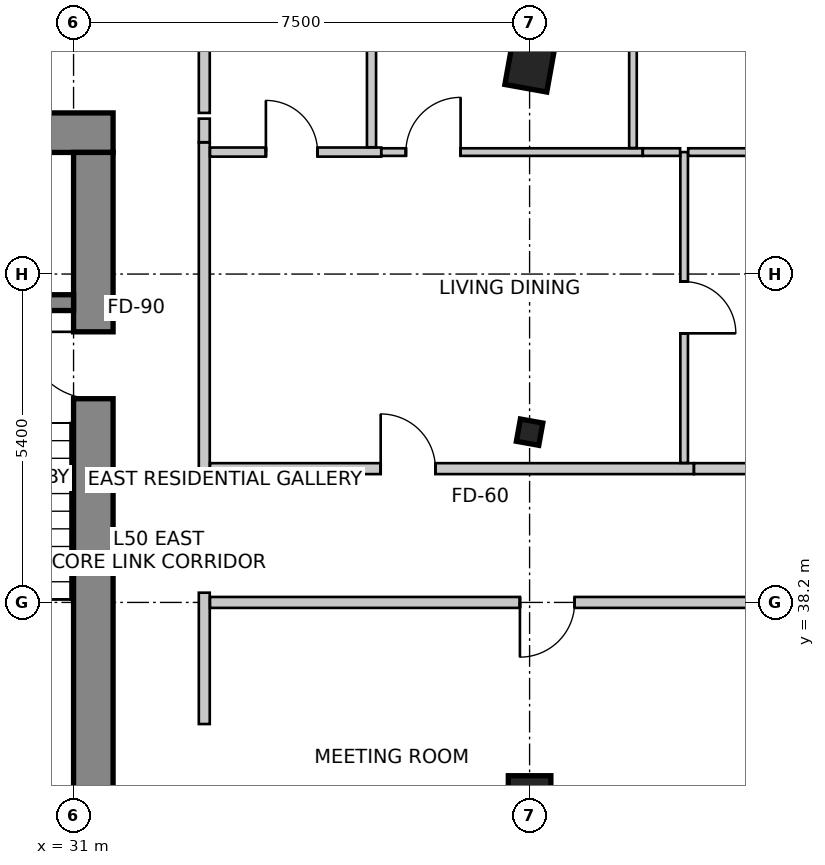
"""IFC4 building model, lengths in metres.
Left out: names, types, materials, properties, quantities, classifications, styles, units other than length and angle.
Written with IfcOpenShell. Run it as: python <this file> out.ifc"""

import sys

from ifc_helpers import new_model, si_unit, direction, frame, frame_2d, origin, origin_2d, place, context, subcontext, project, spatial, rectangle, i_section, extrude, source, transform, mapped, element, fill, save


model = new_model("IFC4")
c1 = context("Model", 3, precision=1e-05, world=origin(), true_north=direction((0.0, 1.0)))
c2 = subcontext(c1, "Body", "Model", "MODEL_VIEW")
j1 = project(units=[si_unit("LENGTHUNIT", "METRE"), si_unit("PLANEANGLEUNIT", "RADIAN")], contexts=[c1])
p1 = place(None, origin())
s1 = spatial("IfcSite", under=j1, at=p1, CompositionType="ELEMENT")
p2 = place(p1, origin())
s2 = spatial("IfcBuilding", under=s1, at=p2, CompositionType="ELEMENT")
p3 = place(p2, frame((0.0, 0.0, 200.9)))
s3 = spatial("IfcBuildingStorey", under=s2, at=p3, CompositionType="ELEMENT", Elevation=200.9)
p4 = place(p3, frame((15.95, 45.925, 0.0), z_axis=(0.0, 0.0, 1.0), x_axis=(1.0, 0.0, 0.0)))
e1 = element("IfcWall", 1, at=p4, inside=s3, PredefinedType="SHEAR", context=c2, shape_type="SweptSolid", body=[
    extrude(rectangle(XDim=15.7, YDim=0.65, at=frame_2d((7.85, 0.0))), origin(), (0.0, 0.0, 1.0), 3.5),
])
p5 = place(p3, frame((31.325, 34.2, 0.0), z_axis=(0.0, 0.0, 1.0), x_axis=(0.0, 1.0, 0.0)))
e2 = element("IfcWall", 2, at=p5, inside=s3, PredefinedType="SHEAR", context=c2, shape_type="SweptSolid", body=[
    extrude(rectangle(XDim=11.4, YDim=0.65, at=frame_2d((5.7, 0.0))), origin(), (0.0, 0.0, 1.0), 3.5),
])
m1 = source(origin(), c2, "Body", "SweptSolid", [
    extrude(rectangle(XDim=1.1, YDim=2.15, at=frame_2d((0.55, 1.075))), frame((0.0, 0.335, 0.0), z_axis=(0.0, -1.0, 0.0), x_axis=(1.0, 0.0, 0.0)), (0.0, 0.0, 1.0), 0.67),
])
p6 = place(p5, frame((7.35, 0.0, 0.0)))
e3 = element("IfcOpeningElement", 3, at=p6, cuts=e2, PredefinedType="OPENING", context=c2, shape_type="MappedRepresentation", body=[
    mapped(m1, transform((0.0, 0.0, 0.0), scale=1.0)),
])
p7 = place(p3, frame((27.5, 43.13, 0.0), z_axis=(0.0, 0.0, 1.0), x_axis=(1.0, 0.0, 0.0)))
e4 = element("IfcWall", 4, at=p7, inside=s3, PredefinedType="SHEAR", context=c2, shape_type="SweptSolid", body=[
    extrude(rectangle(XDim=3.5, YDim=0.26, at=frame_2d((1.75, 0.0))), origin(), (0.0, 0.0, 1.0), 3.5),
])
m2 = source(origin(), c2, "Body", "SweptSolid", [
    extrude(rectangle(XDim=0.7, YDim=0.7, at=origin_2d()), origin(), (0.0, 0.0, 1.0), 3.5),
])
for number, where, z_axis, x_axis in (
    (5, (38.5, 47.0, 0.0), (0.0, 0.0, 1.0), (0.984, -0.177, 0.0)),
    (6, (38.5, 35.0, 0.0), (0.0, 0.0, 1.0), (1.0, 0.0, 0.0)),
):
    element("IfcColumn", number, at=place(p3, frame(where, z_axis=z_axis, x_axis=x_axis)), inside=s3, PredefinedType="COLUMN", context=c2, shape_type="MappedRepresentation", body=[
        mapped(m2, transform((0.0, 0.0, 0.0), scale=1.0)),
    ])
m3 = source(origin(), c2, "Body", "SweptSolid", [
    extrude(i_section(OverallWidth=0.374, OverallDepth=0.372, WebThickness=0.016, FlangeThickness=0.026, FilletRadius=0.015, at=origin_2d()), origin(), (0.0, 0.0, 1.0), 3.5),
])
p8 = place(p3, frame((38.5, 41.0, 0.0), z_axis=(0.0, 0.0, 1.0), x_axis=(0.984195607969, -0.17708474032, 0.0)))
e7 = element("IfcColumn", 7, at=p8, inside=s3, PredefinedType="COLUMN", context=c2, shape_type="MappedRepresentation", body=[
    mapped(m3, transform((0.0, 0.0, 0.0), scale=1.0)),
])
p9 = place(p3, frame((33.15, 47.706, 0.0), z_axis=(0.0, 0.0, 1.0), x_axis=(0.0, -1.0, 0.0)))
e8 = element("IfcWall", 8, at=p9, inside=s3, PredefinedType="PARTITIONING", context=c2, shape_type="SweptSolid", body=[
    extrude(rectangle(XDim=1.456, YDim=0.18, at=frame_2d((0.728, 0.0))), origin(), (0.0, 0.0, 1.0), 2.822),
])
p10 = place(p3, frame((33.15, 45.766, 0.0), z_axis=(0.0, 0.0, 1.0), x_axis=(0.0, -1.0, 0.0)))
e9 = element("IfcWall", 9, at=p10, inside=s3, PredefinedType="PARTITIONING", context=c2, shape_type="SweptSolid", body=[
    extrude(rectangle(XDim=5.526, YDim=0.18, at=frame_2d((2.763, 0.0))), origin(), (0.0, 0.0, 1.0), 2.822),
])
p11 = place(p3, frame((33.15, 46.156, 0.0), z_axis=(0.0, 0.0, 1.0), x_axis=(0.0, -1.0, 0.0)))
e10 = element("IfcWall", 10, at=p11, inside=s3, PredefinedType="PARTITIONING", context=c2, shape_type="SweptSolid", body=[
    extrude(rectangle(XDim=0.388, YDim=0.18, at=frame_2d((0.194, 0.0))), origin(), (0.0, 0.0, 1.0), 2.934),
])
p12 = place(p3, frame((33.15, 38.36, 0.0), z_axis=(0.0, 0.0, 1.0), x_axis=(0.0, -1.0, 0.0)))
e11 = element("IfcWall", 11, at=p12, inside=s3, PredefinedType="PARTITIONING", context=c2, shape_type="SweptSolid", body=[
    extrude(rectangle(XDim=2.16, YDim=0.18, at=frame_2d((1.08, 0.0))), origin(), (0.0, 0.0, 1.0), 3.25),
])
p13 = place(p3, frame((33.244, 40.4, 0.0), z_axis=(0.0, 0.0, 1.0), x_axis=(1.0, 0.0, 0.0)))
e12 = element("IfcWall", 12, at=p13, inside=s3, PredefinedType="PARTITIONING", context=c2, shape_type="SweptSolid", body=[
    extrude(rectangle(XDim=7.958, YDim=0.18, at=frame_2d((3.979, 0.0))), origin(), (0.0, 0.0, 1.0), 2.766),
])
m4 = source(origin(), c2, "Body", "SweptSolid", [
    extrude(rectangle(XDim=0.9, YDim=2.15, at=frame_2d((0.45, 1.075))), frame((0.0, 0.1, 0.0), z_axis=(0.0, -1.0, 0.0), x_axis=(1.0, 0.0, 0.0)), (0.0, 0.0, 1.0), 0.2),
])
p14 = place(p13, frame((2.807, 0.0, 0.0)))
e13 = element("IfcOpeningElement", 13, at=p14, cuts=e12, PredefinedType="OPENING", context=c2, shape_type="MappedRepresentation", body=[
    mapped(m4, transform((0.0, 0.0, 0.0), scale=1.0)),
])
p15 = place(p3, frame((41.204, 40.4, 0.0), z_axis=(0.0, 0.0, 1.0), x_axis=(1.0, 0.0, 0.0)))
e14 = element("IfcWall", 14, at=p15, inside=s3, PredefinedType="PARTITIONING", context=c2, shape_type="SweptSolid", body=[
    extrude(rectangle(XDim=3.456, YDim=0.18, at=frame_2d((1.728, 0.0))), origin(), (0.0, 0.0, 1.0), 2.822),
])
p16 = place(p3, frame((44.338, 38.2, 0.0), z_axis=(0.0, 0.0, 1.0), x_axis=(-1.0, 0.0, 0.0)))
e15 = element("IfcWall", 15, at=p16, inside=s3, PredefinedType="PARTITIONING", context=c2, shape_type="SweptSolid", body=[
    extrude(rectangle(XDim=11.094, YDim=0.18, at=frame_2d((5.547, 0.0))), origin(), (0.0, 0.0, 1.0), 2.766),
])
p17 = place(p16, frame((5.097, 0.0, 0.0)))
e16 = element("IfcOpeningElement", 16, at=p17, cuts=e15, PredefinedType="OPENING", context=c2, shape_type="MappedRepresentation", body=[
    mapped(m4, transform((0.0, 0.0, 0.0), scale=1.0)),
])
p18 = place(p3, frame((41.042, 45.606, 0.0), z_axis=(0.0, 0.0, 1.0), x_axis=(0.0, -1.0, 0.0)))
e17 = element("IfcWall", 17, at=p18, inside=s3, PredefinedType="PARTITIONING", context=c2, shape_type="SweptSolid", body=[
    extrude(rectangle(XDim=5.112, YDim=0.125, at=frame_2d((2.556, 0.0))), origin(), (0.0, 0.0, 1.0), 2.822),
])
m5 = source(origin(), c2, "Body", "SweptSolid", [
    extrude(rectangle(XDim=0.85, YDim=2.15, at=frame_2d((0.425, 1.075))), frame((0.0, 0.073, 0.0), z_axis=(0.0, -1.0, 0.0), x_axis=(1.0, 0.0, 0.0)), (0.0, 0.0, 1.0), 0.145),
])
p19 = place(p18, frame((2.131, 0.0, 0.0)))
e18 = element("IfcOpeningElement", 18, at=p19, cuts=e17, PredefinedType="OPENING", context=c2, shape_type="MappedRepresentation", body=[
    mapped(m5, transform((0.0, 0.0, 0.0), scale=1.0)),
])
p20 = place(p3, frame((33.244, 45.606, 0.0), z_axis=(0.0, 0.0, 1.0), x_axis=(1.0, 0.0, 0.0)))
e19 = element("IfcWall", 19, at=p20, inside=s3, PredefinedType="PARTITIONING", context=c2, shape_type="SweptSolid", body=[
    extrude(rectangle(XDim=2.816, YDim=0.15, at=frame_2d((1.408, 0.0))), origin(), (0.0, 0.0, 1.0), 2.822),
])
m6 = source(origin(), c2, "Body", "SweptSolid", [
    extrude(rectangle(XDim=0.85, YDim=2.15, at=frame_2d((0.425, 1.075))), frame((0.0, 0.085, 0.0), z_axis=(0.0, -1.0, 0.0), x_axis=(1.0, 0.0, 0.0)), (0.0, 0.0, 1.0), 0.17),
])
p21 = place(p20, frame((0.919, 0.0, 0.0)))
e20 = element("IfcOpeningElement", 20, at=p21, cuts=e19, PredefinedType="OPENING", context=c2, shape_type="MappedRepresentation", body=[
    mapped(m6, transform((0.0, 0.0, 0.0), scale=1.0)),
])
p22 = place(p3, frame((36.062, 45.606, 0.0), z_axis=(0.0, 0.0, 1.0), x_axis=(1.0, 0.0, 0.0)))
e21 = element("IfcWall", 21, at=p22, inside=s3, PredefinedType="PARTITIONING", context=c2, shape_type="SweptSolid", body=[
    extrude(rectangle(XDim=4.298, YDim=0.125, at=frame_2d((2.149, 0.0))), origin(), (0.0, 0.0, 1.0), 2.766),
])
m7 = source(origin(), c2, "Body", "SweptSolid", [
    extrude(rectangle(XDim=0.9, YDim=2.15, at=frame_2d((0.45, 1.075))), frame((0.0, 0.073, 0.0), z_axis=(0.0, -1.0, 0.0), x_axis=(1.0, 0.0, 0.0)), (0.0, 0.0, 1.0), 0.145),
])
p23 = place(p22, frame((0.403, 0.0, 0.0)))
e22 = element("IfcOpeningElement", 22, at=p23, cuts=e21, PredefinedType="OPENING", context=c2, shape_type="MappedRepresentation", body=[
    mapped(m7, transform((0.0, 0.0, 0.0), scale=1.0)),
])
p24 = place(p3, frame((40.362, 45.606, 0.0), z_axis=(0.0, 0.0, 1.0), x_axis=(1.0, 0.0, 0.0)))
e23 = element("IfcWall", 23, at=p24, inside=s3, PredefinedType="PARTITIONING", context=c2, shape_type="SweptSolid", body=[
    extrude(rectangle(XDim=0.614, YDim=0.125, at=frame_2d((0.307, 0.0))), origin(), (0.0, 0.0, 1.0), 3.25),
])
p25 = place(p3, frame((41.108, 45.606, 0.0), z_axis=(0.0, 0.0, 1.0), x_axis=(1.0, 0.0, 0.0)))
e24 = element("IfcWall", 24, at=p25, inside=s3, PredefinedType="PARTITIONING", context=c2, shape_type="SweptSolid", body=[
    extrude(rectangle(XDim=3.392, YDim=0.125, at=frame_2d((1.696, 0.0))), origin(), (0.0, 0.0, 1.0), 3.25),
])
p26 = place(p25, frame((1.246, 0.0, 0.0)))
e25 = element("IfcOpeningElement", 25, at=p26, cuts=e24, PredefinedType="OPENING", context=c2, shape_type="MappedRepresentation", body=[
    mapped(m7, transform((0.0, 0.0, 0.0), scale=1.0)),
])
p27 = place(p3, frame((35.9, 50.34, 0.0), z_axis=(0.0, 0.0, 1.0), x_axis=(0.0, -1.0, 0.0)))
e26 = element("IfcWall", 26, at=p27, inside=s3, PredefinedType="PARTITIONING", context=c2, shape_type="SweptSolid", body=[
    extrude(rectangle(XDim=4.655, YDim=0.15, at=frame_2d((2.327, 0.0))), origin(), (0.0, 0.0, 1.0), 2.542),
])
p28 = place(p3, frame((40.2, 49.6, 0.0), z_axis=(0.0, 0.0, 1.0), x_axis=(0.0, -1.0, 0.0)))
e27 = element("IfcWall", 27, at=p28, inside=s3, PredefinedType="PARTITIONING", context=c2, shape_type="SweptSolid", body=[
    extrude(rectangle(XDim=3.927, YDim=0.125, at=frame_2d((1.964, 0.0))), origin(), (0.0, 0.0, 1.0), 2.542),
])
m8 = source(origin(), c2, "Body", "SweptSolid", [
    extrude(rectangle(XDim=1.1, YDim=2.15, at=frame_2d((0.55, 1.075))), frame((0.0, 0.025, 0.0), z_axis=(0.0, -1.0, 0.0), x_axis=(1.0, 0.0, 0.0)), (0.0, 0.0, 1.0), 0.05),
])
p29 = place(p6, origin())
e28 = element("IfcDoor", 28, at=p29, inside=s3, OperationType="SINGLE_SWING_RIGHT", PredefinedType="DOOR", context=c2, shape_type="MappedRepresentation", body=[
    mapped(m8, transform((0.0, 0.0, 0.0), scale=1.0)),
])
fill(e3, e28)
m9 = source(origin(), c2, "Body", "SweptSolid", [
    extrude(rectangle(XDim=0.9, YDim=2.15, at=frame_2d((0.45, 1.075))), frame((0.0, 0.025, 0.0), z_axis=(0.0, -1.0, 0.0), x_axis=(1.0, 0.0, 0.0)), (0.0, 0.0, 1.0), 0.05),
])
p30 = place(p14, origin())
e29 = element("IfcDoor", 29, at=p30, inside=s3, OperationType="SINGLE_SWING_LEFT", PredefinedType="DOOR", context=c2, shape_type="MappedRepresentation", body=[
    mapped(m9, transform((0.0, 0.0, 0.0), scale=1.0)),
])
fill(e13, e29)
m10 = source(origin(), c2, "Body", "SweptSolid", [
    extrude(rectangle(XDim=0.85, YDim=2.15, at=frame_2d((0.425, 1.075))), frame((0.0, 0.025, 0.0), z_axis=(0.0, -1.0, 0.0), x_axis=(1.0, 0.0, 0.0)), (0.0, 0.0, 1.0), 0.05),
])
p31 = place(p19, origin())
e30 = element("IfcDoor", 30, at=p31, inside=s3, OperationType="SINGLE_SWING_RIGHT", PredefinedType="DOOR", context=c2, shape_type="MappedRepresentation", body=[
    mapped(m10, transform((0.0, 0.0, 0.0), scale=1.0)),
])
fill(e18, e30)
p32 = place(p21, origin())
e31 = element("IfcDoor", 31, at=p32, inside=s3, OperationType="SINGLE_SWING_LEFT", PredefinedType="DOOR", context=c2, shape_type="MappedRepresentation", body=[
    mapped(m10, transform((0.0, 0.0, 0.0), scale=1.0)),
])
fill(e20, e31)
m11 = source(origin(), c2, "Body", "SweptSolid", [
    extrude(rectangle(XDim=0.9, YDim=2.15, at=frame_2d((0.45, 1.075))), frame((0.0, 0.025, 0.0), z_axis=(0.0, -1.0, 0.0), x_axis=(1.0, 0.0, 0.0)), (0.0, 0.0, 1.0), 0.05),
])
p33 = place(p23, origin())
e32 = element("IfcDoor", 32, at=p33, inside=s3, OperationType="SINGLE_SWING_RIGHT", PredefinedType="DOOR", context=c2, shape_type="MappedRepresentation", body=[
    mapped(m11, transform((0.0, 0.0, 0.0), scale=1.0)),
])
fill(e22, e32)
p34 = place(p17, origin())
e33 = element("IfcDoor", 33, at=p34, inside=s3, OperationType="SINGLE_SWING_RIGHT", PredefinedType="DOOR", context=c2, shape_type="MappedRepresentation", body=[
    mapped(m11, transform((0.0, 0.0, 0.0), scale=1.0)),
])
fill(e16, e33)
save(model, sys.argv[1])
